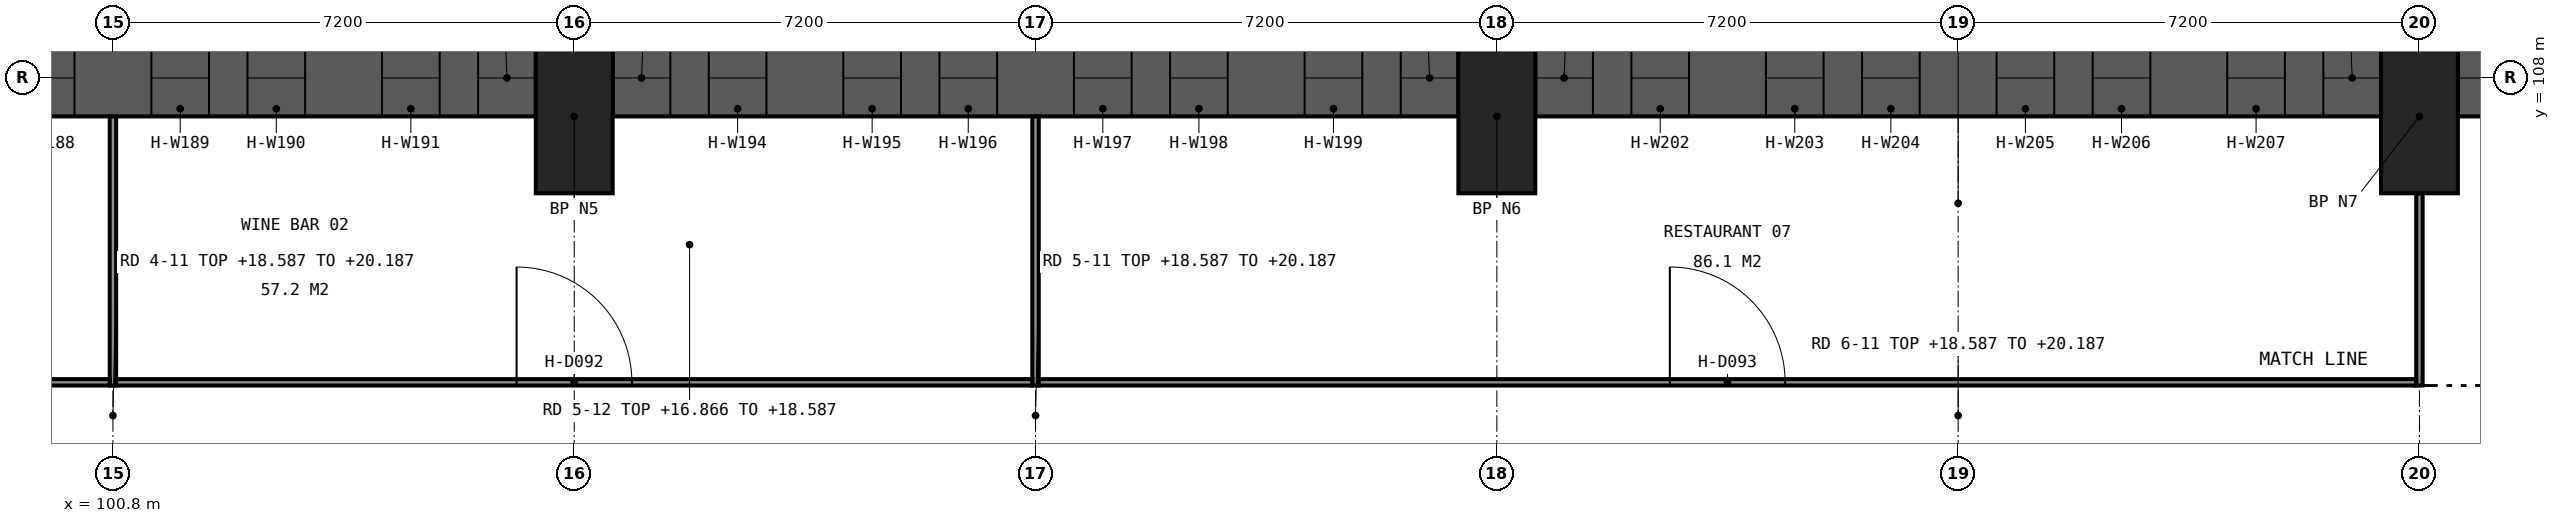
"""IFC4 building model, lengths in metres.
Left out: names, types, materials, properties, quantities, classifications, styles, units other than length and angle.
Written with IfcOpenShell. Run it as: python <this file> out.ifc"""

import sys

from ifc_helpers import new_model, si_unit, direction, frame, frame_2d, origin, origin_2d, place, context, subcontext, project, spatial, rectangle, extrude, element, fill, save


model = new_model("IFC4")
c1 = context("Model", 3, precision=1e-05, world=origin(), true_north=direction((0.0, 1.0)))
c2 = subcontext(c1, "Body", "Model", "MODEL_VIEW")
j1 = project(units=[si_unit("LENGTHUNIT", "METRE"), si_unit("PLANEANGLEUNIT", "RADIAN")], contexts=[c1])
p1 = place(None, origin())
s1 = spatial("IfcSite", under=j1, at=p1, CompositionType="ELEMENT")
p2 = place(p1, origin())
s2 = spatial("IfcBuilding", under=s1, at=p2, CompositionType="ELEMENT")
p3 = place(p2, frame((0.0, 0.0, 9.6)))
s3 = spatial("IfcBuildingStorey", under=s2, at=p3, CompositionType="ELEMENT", Elevation=9.6)
for number, where, z_axis, x_axis in (
    (1, (108.0, 107.4, 0.0), (0.0, 0.0, 1.0), (1.0, 0.0, 0.0)),
    (2, (122.4, 107.4, 0.0), (0.0, 0.0, 1.0), (1.0, 0.0, 0.0)),
    (3, (136.8, 107.4, 0.0), (0.0, 0.0, 1.0), (1.0, 0.0, 0.0)),
):
    element("IfcColumn", number, at=place(p3, frame(where, z_axis=z_axis, x_axis=x_axis)), inside=s3, PredefinedType="COLUMN", context=c2, shape_type="SweptSolid", body=[
        extrude(rectangle(XDim=1.2, YDim=2.4, at=origin_2d()), origin(), (0.0, 0.0, 1.0), 5.4),
    ])
p4 = place(p3, frame((94.2, 108.0, 0.0), z_axis=(0.0, 0.0, 1.0), x_axis=(1.0, 0.0, 0.0)))
e4 = element("IfcWall", 4, at=p4, inside=s3, PredefinedType="SOLIDWALL", context=c2, shape_type="SweptSolid", body=[
    extrude(rectangle(XDim=13.2, YDim=1.2, at=frame_2d((6.6, 0.0))), origin(), (0.0, 0.0, 1.0), 6.6),
])
p5 = place(p4, frame((0.0, 0.0, 1.2)))
e5 = element("IfcOpeningElement", 5, at=p5, cuts=e4, PredefinedType="OPENING", context=c2, shape_type="SweptSolid", body=[
    extrude(rectangle(XDim=0.9, YDim=4.5, at=frame_2d((0.45, 2.25))), frame((0.0, 0.61, 0.0), z_axis=(0.0, -1.0, 0.0), x_axis=(1.0, 0.0, 0.0)), (0.0, 0.0, 1.0), 1.22),
])
p6 = place(p4, frame((1.5, 0.0, 1.2)))
e6 = element("IfcOpeningElement", 6, at=p6, cuts=e4, PredefinedType="OPENING", context=c2, shape_type="SweptSolid", body=[
    extrude(rectangle(XDim=0.9, YDim=4.5, at=frame_2d((0.45, 2.25))), frame((0.0, 0.61, 0.0), z_axis=(0.0, -1.0, 0.0), x_axis=(1.0, 0.0, 0.0)), (0.0, 0.0, 1.0), 1.22),
])
p7 = place(p4, frame((3.6, 0.0, 1.2)))
e7 = element("IfcOpeningElement", 7, at=p7, cuts=e4, PredefinedType="OPENING", context=c2, shape_type="SweptSolid", body=[
    extrude(rectangle(XDim=0.9, YDim=4.5, at=frame_2d((0.45, 2.25))), frame((0.0, 0.61, 0.0), z_axis=(0.0, -1.0, 0.0), x_axis=(1.0, 0.0, 0.0)), (0.0, 0.0, 1.0), 1.22),
])
p8 = place(p4, frame((5.1, 0.0, 1.2)))
e8 = element("IfcOpeningElement", 8, at=p8, cuts=e4, PredefinedType="OPENING", context=c2, shape_type="SweptSolid", body=[
    extrude(rectangle(XDim=0.9, YDim=4.5, at=frame_2d((0.45, 2.25))), frame((0.0, 0.61, 0.0), z_axis=(0.0, -1.0, 0.0), x_axis=(1.0, 0.0, 0.0)), (0.0, 0.0, 1.0), 1.22),
])
p9 = place(p4, frame((7.2, 0.0, 1.2)))
e9 = element("IfcOpeningElement", 9, at=p9, cuts=e4, PredefinedType="OPENING", context=c2, shape_type="SweptSolid", body=[
    extrude(rectangle(XDim=0.9, YDim=4.5, at=frame_2d((0.45, 2.25))), frame((0.0, 0.61, 0.0), z_axis=(0.0, -1.0, 0.0), x_axis=(1.0, 0.0, 0.0)), (0.0, 0.0, 1.0), 1.22),
])
p10 = place(p4, frame((8.7, 0.0, 1.2)))
e10 = element("IfcOpeningElement", 10, at=p10, cuts=e4, PredefinedType="OPENING", context=c2, shape_type="SweptSolid", body=[
    extrude(rectangle(XDim=0.9, YDim=4.5, at=frame_2d((0.45, 2.25))), frame((0.0, 0.61, 0.0), z_axis=(0.0, -1.0, 0.0), x_axis=(1.0, 0.0, 0.0)), (0.0, 0.0, 1.0), 1.22),
])
p11 = place(p4, frame((10.8, 0.0, 1.2)))
e11 = element("IfcOpeningElement", 11, at=p11, cuts=e4, PredefinedType="OPENING", context=c2, shape_type="SweptSolid", body=[
    extrude(rectangle(XDim=0.9, YDim=4.5, at=frame_2d((0.45, 2.25))), frame((0.0, 0.61, 0.0), z_axis=(0.0, -1.0, 0.0), x_axis=(1.0, 0.0, 0.0)), (0.0, 0.0, 1.0), 1.22),
])
p12 = place(p4, frame((12.3, 0.0, 1.2)))
e12 = element("IfcOpeningElement", 12, at=p12, cuts=e4, PredefinedType="OPENING", context=c2, shape_type="SweptSolid", body=[
    extrude(rectangle(XDim=0.9, YDim=4.5, at=frame_2d((0.45, 2.25))), frame((0.0, 0.61, 0.0), z_axis=(0.0, -1.0, 0.0), x_axis=(1.0, 0.0, 0.0)), (0.0, 0.0, 1.0), 1.22),
])
p13 = place(p3, frame((108.6, 108.0, 0.0), z_axis=(0.0, 0.0, 1.0), x_axis=(1.0, 0.0, 0.0)))
e13 = element("IfcWall", 13, at=p13, inside=s3, PredefinedType="SOLIDWALL", context=c2, shape_type="SweptSolid", body=[
    extrude(rectangle(XDim=13.2, YDim=1.2, at=frame_2d((6.6, 0.0))), origin(), (0.0, 0.0, 1.0), 6.6),
])
p14 = place(p13, frame((0.0, 0.0, 1.2)))
e14 = element("IfcOpeningElement", 14, at=p14, cuts=e13, PredefinedType="OPENING", context=c2, shape_type="SweptSolid", body=[
    extrude(rectangle(XDim=0.9, YDim=4.5, at=frame_2d((0.45, 2.25))), frame((0.0, 0.61, 0.0), z_axis=(0.0, -1.0, 0.0), x_axis=(1.0, 0.0, 0.0)), (0.0, 0.0, 1.0), 1.22),
])
p15 = place(p13, frame((1.5, 0.0, 1.2)))
e15 = element("IfcOpeningElement", 15, at=p15, cuts=e13, PredefinedType="OPENING", context=c2, shape_type="SweptSolid", body=[
    extrude(rectangle(XDim=0.9, YDim=4.5, at=frame_2d((0.45, 2.25))), frame((0.0, 0.61, 0.0), z_axis=(0.0, -1.0, 0.0), x_axis=(1.0, 0.0, 0.0)), (0.0, 0.0, 1.0), 1.22),
])
p16 = place(p13, frame((3.6, 0.0, 1.2)))
e16 = element("IfcOpeningElement", 16, at=p16, cuts=e13, PredefinedType="OPENING", context=c2, shape_type="SweptSolid", body=[
    extrude(rectangle(XDim=0.9, YDim=4.5, at=frame_2d((0.45, 2.25))), frame((0.0, 0.61, 0.0), z_axis=(0.0, -1.0, 0.0), x_axis=(1.0, 0.0, 0.0)), (0.0, 0.0, 1.0), 1.22),
])
p17 = place(p13, frame((5.1, 0.0, 1.2)))
e17 = element("IfcOpeningElement", 17, at=p17, cuts=e13, PredefinedType="OPENING", context=c2, shape_type="SweptSolid", body=[
    extrude(rectangle(XDim=0.9, YDim=4.5, at=frame_2d((0.45, 2.25))), frame((0.0, 0.61, 0.0), z_axis=(0.0, -1.0, 0.0), x_axis=(1.0, 0.0, 0.0)), (0.0, 0.0, 1.0), 1.22),
])
p18 = place(p13, frame((7.2, 0.0, 1.2)))
e18 = element("IfcOpeningElement", 18, at=p18, cuts=e13, PredefinedType="OPENING", context=c2, shape_type="SweptSolid", body=[
    extrude(rectangle(XDim=0.9, YDim=4.5, at=frame_2d((0.45, 2.25))), frame((0.0, 0.61, 0.0), z_axis=(0.0, -1.0, 0.0), x_axis=(1.0, 0.0, 0.0)), (0.0, 0.0, 1.0), 1.22),
])
p19 = place(p13, frame((8.7, 0.0, 1.2)))
e19 = element("IfcOpeningElement", 19, at=p19, cuts=e13, PredefinedType="OPENING", context=c2, shape_type="SweptSolid", body=[
    extrude(rectangle(XDim=0.9, YDim=4.5, at=frame_2d((0.45, 2.25))), frame((0.0, 0.61, 0.0), z_axis=(0.0, -1.0, 0.0), x_axis=(1.0, 0.0, 0.0)), (0.0, 0.0, 1.0), 1.22),
])
p20 = place(p13, frame((10.8, 0.0, 1.2)))
e20 = element("IfcOpeningElement", 20, at=p20, cuts=e13, PredefinedType="OPENING", context=c2, shape_type="SweptSolid", body=[
    extrude(rectangle(XDim=0.9, YDim=4.5, at=frame_2d((0.45, 2.25))), frame((0.0, 0.61, 0.0), z_axis=(0.0, -1.0, 0.0), x_axis=(1.0, 0.0, 0.0)), (0.0, 0.0, 1.0), 1.22),
])
p21 = place(p13, frame((12.3, 0.0, 1.2)))
e21 = element("IfcOpeningElement", 21, at=p21, cuts=e13, PredefinedType="OPENING", context=c2, shape_type="SweptSolid", body=[
    extrude(rectangle(XDim=0.9, YDim=4.5, at=frame_2d((0.45, 2.25))), frame((0.0, 0.61, 0.0), z_axis=(0.0, -1.0, 0.0), x_axis=(1.0, 0.0, 0.0)), (0.0, 0.0, 1.0), 1.22),
])
p22 = place(p3, frame((123.0, 108.0, 0.0), z_axis=(0.0, 0.0, 1.0), x_axis=(1.0, 0.0, 0.0)))
e22 = element("IfcWall", 22, at=p22, inside=s3, PredefinedType="SOLIDWALL", context=c2, shape_type="SweptSolid", body=[
    extrude(rectangle(XDim=13.2, YDim=1.2, at=frame_2d((6.6, 0.0))), origin(), (0.0, 0.0, 1.0), 6.6),
])
p23 = place(p22, frame((0.0, 0.0, 1.2)))
e23 = element("IfcOpeningElement", 23, at=p23, cuts=e22, PredefinedType="OPENING", context=c2, shape_type="SweptSolid", body=[
    extrude(rectangle(XDim=0.9, YDim=4.5, at=frame_2d((0.45, 2.25))), frame((0.0, 0.61, 0.0), z_axis=(0.0, -1.0, 0.0), x_axis=(1.0, 0.0, 0.0)), (0.0, 0.0, 1.0), 1.22),
])
p24 = place(p22, frame((1.5, 0.0, 1.2)))
e24 = element("IfcOpeningElement", 24, at=p24, cuts=e22, PredefinedType="OPENING", context=c2, shape_type="SweptSolid", body=[
    extrude(rectangle(XDim=0.9, YDim=4.5, at=frame_2d((0.45, 2.25))), frame((0.0, 0.61, 0.0), z_axis=(0.0, -1.0, 0.0), x_axis=(1.0, 0.0, 0.0)), (0.0, 0.0, 1.0), 1.22),
])
p25 = place(p22, frame((3.6, 0.0, 1.2)))
e25 = element("IfcOpeningElement", 25, at=p25, cuts=e22, PredefinedType="OPENING", context=c2, shape_type="SweptSolid", body=[
    extrude(rectangle(XDim=0.9, YDim=4.5, at=frame_2d((0.45, 2.25))), frame((0.0, 0.61, 0.0), z_axis=(0.0, -1.0, 0.0), x_axis=(1.0, 0.0, 0.0)), (0.0, 0.0, 1.0), 1.22),
])
p26 = place(p22, frame((5.1, 0.0, 1.2)))
e26 = element("IfcOpeningElement", 26, at=p26, cuts=e22, PredefinedType="OPENING", context=c2, shape_type="SweptSolid", body=[
    extrude(rectangle(XDim=0.9, YDim=4.5, at=frame_2d((0.45, 2.25))), frame((0.0, 0.61, 0.0), z_axis=(0.0, -1.0, 0.0), x_axis=(1.0, 0.0, 0.0)), (0.0, 0.0, 1.0), 1.22),
])
p27 = place(p22, frame((7.2, 0.0, 1.2)))
e27 = element("IfcOpeningElement", 27, at=p27, cuts=e22, PredefinedType="OPENING", context=c2, shape_type="SweptSolid", body=[
    extrude(rectangle(XDim=0.9, YDim=4.5, at=frame_2d((0.45, 2.25))), frame((0.0, 0.61, 0.0), z_axis=(0.0, -1.0, 0.0), x_axis=(1.0, 0.0, 0.0)), (0.0, 0.0, 1.0), 1.22),
])
p28 = place(p22, frame((8.7, 0.0, 1.2)))
e28 = element("IfcOpeningElement", 28, at=p28, cuts=e22, PredefinedType="OPENING", context=c2, shape_type="SweptSolid", body=[
    extrude(rectangle(XDim=0.9, YDim=4.5, at=frame_2d((0.45, 2.25))), frame((0.0, 0.61, 0.0), z_axis=(0.0, -1.0, 0.0), x_axis=(1.0, 0.0, 0.0)), (0.0, 0.0, 1.0), 1.22),
])
p29 = place(p22, frame((10.8, 0.0, 1.2)))
e29 = element("IfcOpeningElement", 29, at=p29, cuts=e22, PredefinedType="OPENING", context=c2, shape_type="SweptSolid", body=[
    extrude(rectangle(XDim=0.9, YDim=4.5, at=frame_2d((0.45, 2.25))), frame((0.0, 0.61, 0.0), z_axis=(0.0, -1.0, 0.0), x_axis=(1.0, 0.0, 0.0)), (0.0, 0.0, 1.0), 1.22),
])
p30 = place(p22, frame((12.3, 0.0, 1.2)))
e30 = element("IfcOpeningElement", 30, at=p30, cuts=e22, PredefinedType="OPENING", context=c2, shape_type="SweptSolid", body=[
    extrude(rectangle(XDim=0.9, YDim=4.5, at=frame_2d((0.45, 2.25))), frame((0.0, 0.61, 0.0), z_axis=(0.0, -1.0, 0.0), x_axis=(1.0, 0.0, 0.0)), (0.0, 0.0, 1.0), 1.22),
])
p31 = place(p3, frame((137.4, 108.0, 0.0), z_axis=(0.0, 0.0, 1.0), x_axis=(1.0, 0.0, 0.0)))
e31 = element("IfcWall", 31, at=p31, inside=s3, PredefinedType="SOLIDWALL", context=c2, shape_type="SweptSolid", body=[
    extrude(rectangle(XDim=13.2, YDim=1.2, at=frame_2d((6.6, 0.0))), origin(), (0.0, 0.0, 1.0), 6.6),
])
p32 = place(p31, frame((0.0, 0.0, 1.2)))
e32 = element("IfcOpeningElement", 32, at=p32, cuts=e31, PredefinedType="OPENING", context=c2, shape_type="SweptSolid", body=[
    extrude(rectangle(XDim=0.9, YDim=4.5, at=frame_2d((0.45, 2.25))), frame((0.0, 0.61, 0.0), z_axis=(0.0, -1.0, 0.0), x_axis=(1.0, 0.0, 0.0)), (0.0, 0.0, 1.0), 1.22),
])
p33 = place(p31, frame((1.5, 0.0, 1.2)))
e33 = element("IfcOpeningElement", 33, at=p33, cuts=e31, PredefinedType="OPENING", context=c2, shape_type="SweptSolid", body=[
    extrude(rectangle(XDim=0.9, YDim=4.5, at=frame_2d((0.45, 2.25))), frame((0.0, 0.61, 0.0), z_axis=(0.0, -1.0, 0.0), x_axis=(1.0, 0.0, 0.0)), (0.0, 0.0, 1.0), 1.22),
])
p34 = place(p31, frame((3.6, 0.0, 1.2)))
e34 = element("IfcOpeningElement", 34, at=p34, cuts=e31, PredefinedType="OPENING", context=c2, shape_type="SweptSolid", body=[
    extrude(rectangle(XDim=0.9, YDim=4.5, at=frame_2d((0.45, 2.25))), frame((0.0, 0.61, 0.0), z_axis=(0.0, -1.0, 0.0), x_axis=(1.0, 0.0, 0.0)), (0.0, 0.0, 1.0), 1.22),
])
p35 = place(p31, frame((5.1, 0.0, 1.2)))
e35 = element("IfcOpeningElement", 35, at=p35, cuts=e31, PredefinedType="OPENING", context=c2, shape_type="SweptSolid", body=[
    extrude(rectangle(XDim=0.9, YDim=4.5, at=frame_2d((0.45, 2.25))), frame((0.0, 0.61, 0.0), z_axis=(0.0, -1.0, 0.0), x_axis=(1.0, 0.0, 0.0)), (0.0, 0.0, 1.0), 1.22),
])
p36 = place(p31, frame((7.2, 0.0, 1.2)))
e36 = element("IfcOpeningElement", 36, at=p36, cuts=e31, PredefinedType="OPENING", context=c2, shape_type="SweptSolid", body=[
    extrude(rectangle(XDim=0.9, YDim=4.5, at=frame_2d((0.45, 2.25))), frame((0.0, 0.61, 0.0), z_axis=(0.0, -1.0, 0.0), x_axis=(1.0, 0.0, 0.0)), (0.0, 0.0, 1.0), 1.22),
])
p37 = place(p31, frame((8.7, 0.0, 1.2)))
e37 = element("IfcOpeningElement", 37, at=p37, cuts=e31, PredefinedType="OPENING", context=c2, shape_type="SweptSolid", body=[
    extrude(rectangle(XDim=0.9, YDim=4.5, at=frame_2d((0.45, 2.25))), frame((0.0, 0.61, 0.0), z_axis=(0.0, -1.0, 0.0), x_axis=(1.0, 0.0, 0.0)), (0.0, 0.0, 1.0), 1.22),
])
p38 = place(p31, frame((10.8, 0.0, 1.2)))
e38 = element("IfcOpeningElement", 38, at=p38, cuts=e31, PredefinedType="OPENING", context=c2, shape_type="SweptSolid", body=[
    extrude(rectangle(XDim=0.9, YDim=4.5, at=frame_2d((0.45, 2.25))), frame((0.0, 0.61, 0.0), z_axis=(0.0, -1.0, 0.0), x_axis=(1.0, 0.0, 0.0)), (0.0, 0.0, 1.0), 1.22),
])
p39 = place(p31, frame((12.3, 0.0, 1.2)))
e39 = element("IfcOpeningElement", 39, at=p39, cuts=e31, PredefinedType="OPENING", context=c2, shape_type="SweptSolid", body=[
    extrude(rectangle(XDim=0.9, YDim=4.5, at=frame_2d((0.45, 2.25))), frame((0.0, 0.61, 0.0), z_axis=(0.0, -1.0, 0.0), x_axis=(1.0, 0.0, 0.0)), (0.0, 0.0, 1.0), 1.22),
])
for number, where, z_axis, x_axis in (
    (40, (100.8, 107.4, 0.0), (0.0, 0.0, 1.0), (0.0, -1.0, 0.0)),
    (41, (115.2, 107.4, 0.0), (0.0, 0.0, 1.0), (0.0, -1.0, 0.0)),
):
    element("IfcWall", number, at=place(p3, frame(where, z_axis=z_axis, x_axis=x_axis)), inside=s3, PredefinedType="PARTITIONING", context=c2, shape_type="SweptSolid", body=[
        extrude(rectangle(XDim=4.2, YDim=0.1, at=frame_2d((2.1, 0.0))), origin(), (0.0, 0.0, 1.0), 4.7),
    ])
p40 = place(p3, frame((136.8, 106.2, 0.0), z_axis=(0.0, 0.0, 1.0), x_axis=(0.0, -1.0, 0.0)))
e42 = element("IfcWall", 42, at=p40, inside=s3, PredefinedType="PARTITIONING", context=c2, shape_type="SweptSolid", body=[
    extrude(rectangle(XDim=3.0, YDim=0.1, at=frame_2d((1.5, 0.0))), origin(), (0.0, 0.0, 1.0), 4.7),
])
p41 = place(p3, frame((93.65, 103.25, 0.0), z_axis=(0.0, 0.0, 1.0), x_axis=(1.0, 0.0, 0.0)))
e43 = element("IfcWall", 43, at=p41, inside=s3, PredefinedType="PARTITIONING", context=c2, shape_type="SweptSolid", body=[
    extrude(rectangle(XDim=7.1, YDim=0.1, at=frame_2d((3.55, 0.0))), origin(), (0.0, 0.0, 1.0), 4.7),
])
p42 = place(p41, frame((3.05, 0.0, 0.0)))
e44 = element("IfcOpeningElement", 44, at=p42, cuts=e43, PredefinedType="OPENING", context=c2, shape_type="SweptSolid", body=[
    extrude(rectangle(XDim=1.0, YDim=2.1, at=frame_2d((0.5, 1.05))), frame((0.0, 0.06, 0.0), z_axis=(0.0, -1.0, 0.0), x_axis=(1.0, 0.0, 0.0)), (0.0, 0.0, 1.0), 0.12),
])
p43 = place(p3, frame((100.85, 103.25, 0.0), z_axis=(0.0, 0.0, 1.0), x_axis=(1.0, 0.0, 0.0)))
e45 = element("IfcWall", 45, at=p43, inside=s3, PredefinedType="PARTITIONING", context=c2, shape_type="SweptSolid", body=[
    extrude(rectangle(XDim=14.3, YDim=0.1, at=frame_2d((7.15, 0.0))), origin(), (0.0, 0.0, 1.0), 4.7),
])
p44 = place(p43, frame((6.25, 0.0, 0.0)))
e46 = element("IfcOpeningElement", 46, at=p44, cuts=e45, PredefinedType="OPENING", context=c2, shape_type="SweptSolid", body=[
    extrude(rectangle(XDim=1.8, YDim=2.1, at=frame_2d((0.9, 1.05))), frame((0.0, 0.06, 0.0), z_axis=(0.0, -1.0, 0.0), x_axis=(1.0, 0.0, 0.0)), (0.0, 0.0, 1.0), 0.12),
])
p45 = place(p3, frame((115.25, 103.25, 0.0), z_axis=(0.0, 0.0, 1.0), x_axis=(1.0, 0.0, 0.0)))
e47 = element("IfcWall", 47, at=p45, inside=s3, PredefinedType="PARTITIONING", context=c2, shape_type="SweptSolid", body=[
    extrude(rectangle(XDim=21.5, YDim=0.1, at=frame_2d((10.75, 0.0))), origin(), (0.0, 0.0, 1.0), 4.7),
])
p46 = place(p45, frame((9.85, 0.0, 0.0)))
e48 = element("IfcOpeningElement", 48, at=p46, cuts=e47, PredefinedType="OPENING", context=c2, shape_type="SweptSolid", body=[
    extrude(rectangle(XDim=1.8, YDim=2.1, at=frame_2d((0.9, 1.05))), frame((0.0, 0.06, 0.0), z_axis=(0.0, -1.0, 0.0), x_axis=(1.0, 0.0, 0.0)), (0.0, 0.0, 1.0), 0.12),
])
p47 = place(p44, origin())
e49 = element("IfcDoor", 49, at=p47, inside=s3, OperationType="DOUBLE_DOOR_SINGLE_SWING", PredefinedType="DOOR", context=c2, shape_type="SweptSolid", body=[
    extrude(rectangle(XDim=1.8, YDim=2.1, at=frame_2d((0.9, 1.05))), frame((0.0, 0.025, 0.0), z_axis=(0.0, -1.0, 0.0), x_axis=(1.0, 0.0, 0.0)), (0.0, 0.0, 1.0), 0.05),
])
fill(e46, e49)
p48 = place(p46, origin())
e50 = element("IfcDoor", 50, at=p48, inside=s3, OperationType="DOUBLE_DOOR_SINGLE_SWING", PredefinedType="DOOR", context=c2, shape_type="SweptSolid", body=[
    extrude(rectangle(XDim=1.8, YDim=2.1, at=frame_2d((0.9, 1.05))), frame((0.0, 0.025, 0.0), z_axis=(0.0, -1.0, 0.0), x_axis=(1.0, 0.0, 0.0)), (0.0, 0.0, 1.0), 0.05),
])
fill(e48, e50)
save(model, sys.argv[1])
